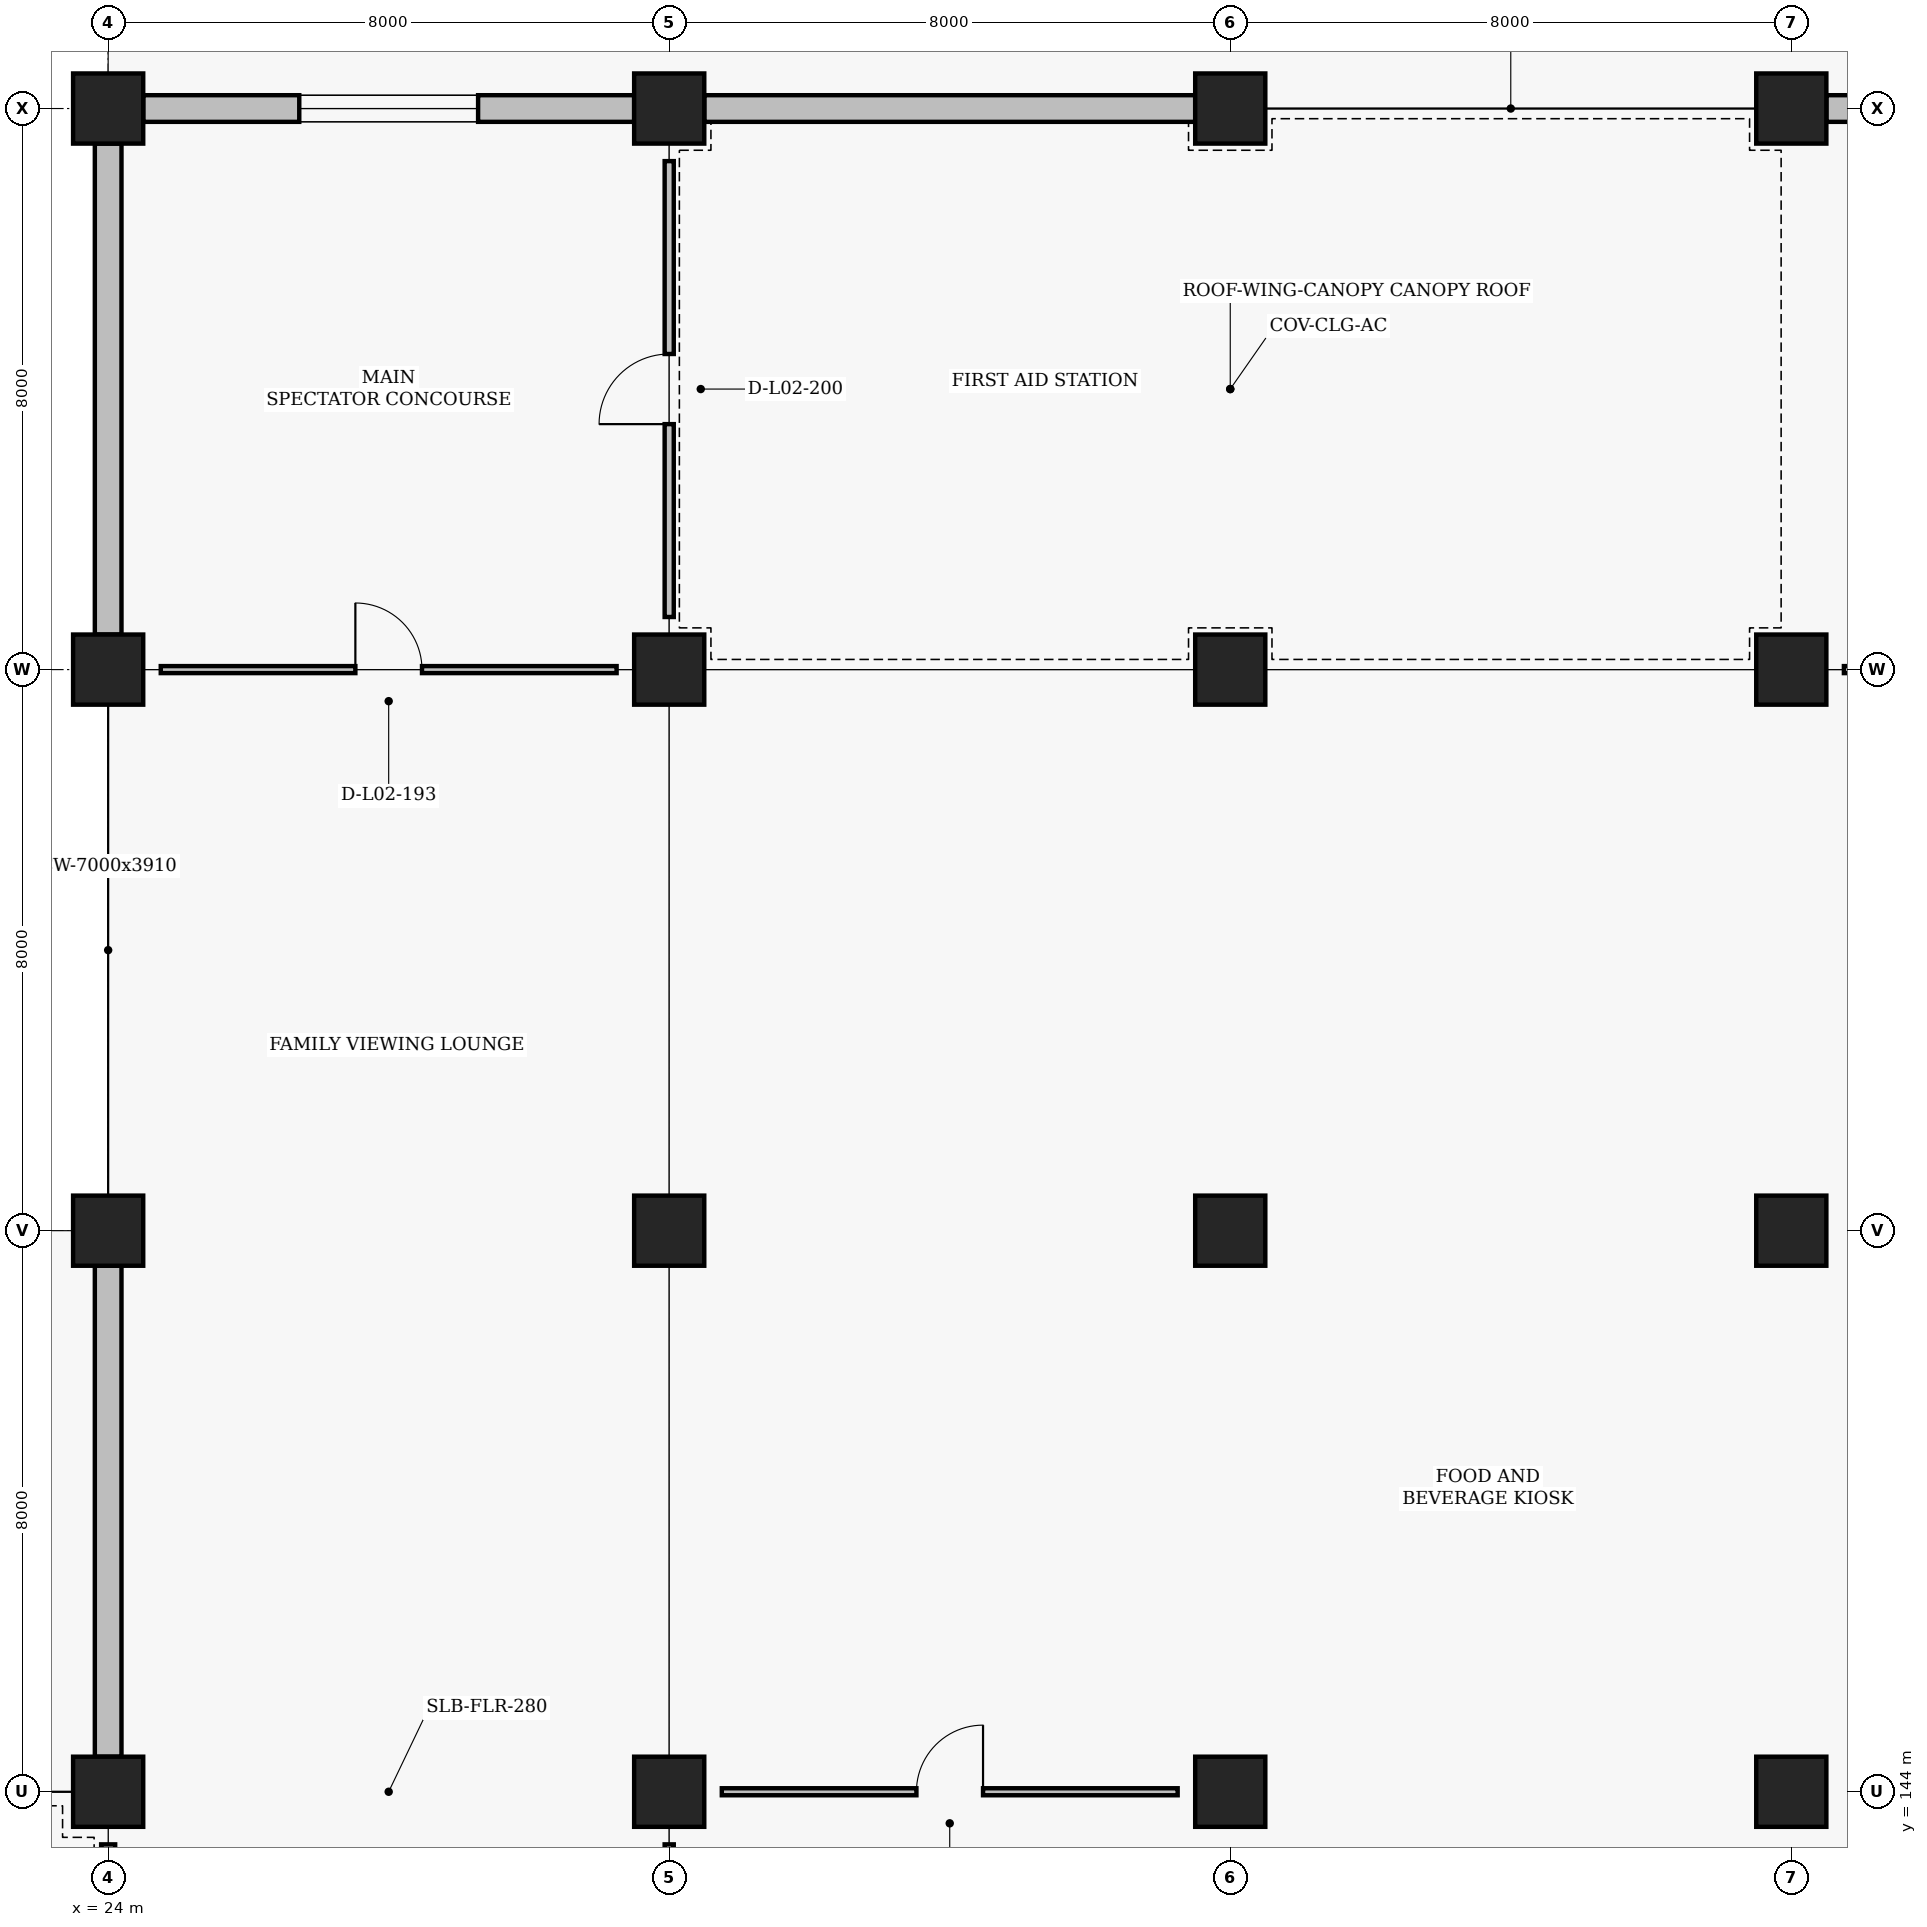
"""IFC4 building model, lengths in metres.
Left out: names, types, materials, properties, quantities, classifications, styles, units other than length and angle.
Written with IfcOpenShell. Run it as: python <this file> out.ifc"""

import sys

from ifc_helpers import new_model, si_unit, direction, frame, frame_2d, origin, origin_2d, place, context, subcontext, project, spatial, rectangle, extrude, element, fill, save


model = new_model("IFC4")
c1 = context("Model", 3, precision=1e-05, world=origin(), true_north=direction((0.0, 1.0)))
c2 = subcontext(c1, "Body", "Model", "MODEL_VIEW")
j1 = project(units=[si_unit("LENGTHUNIT", "METRE"), si_unit("PLANEANGLEUNIT", "RADIAN")], contexts=[c1])
p1 = place(None, origin())
s1 = spatial("IfcSite", under=j1, at=p1, CompositionType="ELEMENT")
p2 = place(p1, origin())
s2 = spatial("IfcBuilding", under=s1, at=p2, CompositionType="ELEMENT")
p3 = place(p2, frame((0.0, 0.0, 4.8)))
s3 = spatial("IfcBuildingStorey", under=s2, at=p3, CompositionType="ELEMENT", Elevation=4.8)
for number, where, z_axis, x_axis in (
    (1, (24.0, 144.0, 0.0), (0.0, 0.0, 1.0), (1.0, 0.0, 0.0)),
    (2, (24.0, 152.0, 0.0), (0.0, 0.0, 1.0), (1.0, 0.0, 0.0)),
    (3, (24.0, 160.0, 0.0), (0.0, 0.0, 1.0), (1.0, 0.0, 0.0)),
    (4, (24.0, 168.0, 0.0), (0.0, 0.0, 1.0), (1.0, 0.0, 0.0)),
    (5, (32.0, 144.0, 0.0), (0.0, 0.0, 1.0), (1.0, 0.0, 0.0)),
    (6, (32.0, 152.0, 0.0), (0.0, 0.0, 1.0), (1.0, 0.0, 0.0)),
    (7, (32.0, 160.0, 0.0), (0.0, 0.0, 1.0), (1.0, 0.0, 0.0)),
    (8, (32.0, 168.0, 0.0), (0.0, 0.0, 1.0), (1.0, 0.0, 0.0)),
    (9, (40.0, 144.0, 0.0), (0.0, 0.0, 1.0), (1.0, 0.0, 0.0)),
    (10, (40.0, 152.0, 0.0), (0.0, 0.0, 1.0), (1.0, 0.0, 0.0)),
    (11, (40.0, 160.0, 0.0), (0.0, 0.0, 1.0), (1.0, 0.0, 0.0)),
    (12, (40.0, 168.0, 0.0), (0.0, 0.0, 1.0), (1.0, 0.0, 0.0)),
    (13, (48.0, 144.0, 0.0), (0.0, 0.0, 1.0), (1.0, 0.0, 0.0)),
    (14, (48.0, 152.0, 0.0), (0.0, 0.0, 1.0), (1.0, 0.0, 0.0)),
    (15, (48.0, 160.0, 0.0), (0.0, 0.0, 1.0), (1.0, 0.0, 0.0)),
    (16, (48.0, 168.0, 0.0), (0.0, 0.0, 1.0), (1.0, 0.0, 0.0)),
):
    element("IfcColumn", number, at=place(p3, frame(where, z_axis=z_axis, x_axis=x_axis)), inside=s3, PredefinedType="COLUMN", context=c2, shape_type="SweptSolid", body=[
        extrude(rectangle(XDim=1.0, YDim=1.0, at=origin_2d()), origin(), (0.0, 0.0, 1.0), 4.8),
    ])
p4 = place(p3, frame((24.0, 144.5, 0.0), z_axis=(0.0, 0.0, 1.0), x_axis=(0.0, 1.0, 0.0)))
e17 = element("IfcWall", 17, at=p4, inside=s3, PredefinedType="SOLIDWALL", context=c2, shape_type="SweptSolid", body=[
    extrude(rectangle(XDim=7.0, YDim=0.38, at=frame_2d((3.5, 0.0))), origin(), (0.0, 0.0, 1.0), 3.91),
])
p5 = place(p3, frame((24.5, 168.0, 0.0), z_axis=(0.0, 0.0, 1.0), x_axis=(1.0, 0.0, 0.0)))
e18 = element("IfcWall", 18, at=p5, inside=s3, PredefinedType="SOLIDWALL", context=c2, shape_type="SweptSolid", body=[
    extrude(rectangle(XDim=7.0, YDim=0.38, at=frame_2d((3.5, 0.0))), origin(), (0.0, 0.0, 1.0), 3.95),
])
p6 = place(p5, frame((2.225, 0.0, 0.95)))
e19 = element("IfcOpeningElement", 19, at=p6, cuts=e18, PredefinedType="OPENING", context=c2, shape_type="SweptSolid", body=[
    extrude(rectangle(XDim=2.55, YDim=2.0, at=frame_2d((1.275, 1.0))), frame((0.0, 0.2, 0.0), z_axis=(0.0, -1.0, 0.0), x_axis=(1.0, 0.0, 0.0)), (0.0, 0.0, 1.0), 0.4),
])
p7 = place(p3, frame((24.0, 160.5, 0.0), z_axis=(0.0, 0.0, 1.0), x_axis=(0.0, 1.0, 0.0)))
e20 = element("IfcWall", 20, at=p7, inside=s3, PredefinedType="SOLIDWALL", context=c2, shape_type="SweptSolid", body=[
    extrude(rectangle(XDim=7.0, YDim=0.38, at=frame_2d((3.5, 0.0))), origin(), (0.0, 0.0, 1.0), 3.91),
])
for number, where, z_axis, x_axis in (
    (21, (32.5, 168.0, 0.0), (0.0, 0.0, 1.0), (1.0, 0.0, 0.0)),
    (22, (48.5, 168.0, 0.0), (0.0, 0.0, 1.0), (1.0, 0.0, 0.0)),
):
    element("IfcWall", number, at=place(p3, frame(where, z_axis=z_axis, x_axis=x_axis)), inside=s3, PredefinedType="SOLIDWALL", context=c2, shape_type="SweptSolid", body=[
        extrude(rectangle(XDim=7.0, YDim=0.38, at=frame_2d((3.5, 0.0))), origin(), (0.0, 0.0, 1.0), 3.95),
    ])
p8 = place(p3, frame((24.0, 136.75, 0.0), z_axis=(0.0, 0.0, 1.0), x_axis=(0.0, 1.0, 0.0)))
e23 = element("IfcWall", 23, at=p8, inside=s3, PredefinedType="PARTITIONING", context=c2, shape_type="SweptSolid", body=[
    extrude(rectangle(XDim=6.5, YDim=0.2, at=frame_2d((3.25, 0.0))), origin(), (0.0, 0.0, 1.0), 3.91),
])
p9 = place(p3, frame((32.0, 136.75, 0.0), z_axis=(0.0, 0.0, 1.0), x_axis=(0.0, 1.0, 0.0)))
e24 = element("IfcWall", 24, at=p9, inside=s3, PredefinedType="PARTITIONING", context=c2, shape_type="SweptSolid", body=[
    extrude(rectangle(XDim=6.5, YDim=0.13, at=frame_2d((3.25, 0.0))), origin(), (0.0, 0.0, 1.0), 3.91),
])
p10 = place(p9, frame((2.75, 0.0, 0.0)))
e25 = element("IfcOpeningElement", 25, at=p10, cuts=e24, PredefinedType="OPENING", context=c2, shape_type="SweptSolid", body=[
    extrude(rectangle(XDim=1.0, YDim=2.1, at=frame_2d((0.5, 1.05))), frame((0.0, 0.075, 0.0), z_axis=(0.0, -1.0, 0.0), x_axis=(1.0, 0.0, 0.0)), (0.0, 0.0, 1.0), 0.15),
])
p11 = place(p3, frame((24.75, 160.0, 0.0), z_axis=(0.0, 0.0, 1.0), x_axis=(1.0, 0.0, 0.0)))
e26 = element("IfcWall", 26, at=p11, inside=s3, PredefinedType="PARTITIONING", context=c2, shape_type="SweptSolid", body=[
    extrude(rectangle(XDim=6.5, YDim=0.1, at=frame_2d((3.25, 0.0))), origin(), (0.0, 0.0, 1.0), 3.91),
])
p12 = place(p11, frame((2.775, 0.0, 0.0)))
e27 = element("IfcOpeningElement", 27, at=p12, cuts=e26, PredefinedType="OPENING", context=c2, shape_type="SweptSolid", body=[
    extrude(rectangle(XDim=0.95, YDim=2.1, at=frame_2d((0.475, 1.05))), frame((0.0, 0.06, 0.0), z_axis=(0.0, -1.0, 0.0), x_axis=(1.0, 0.0, 0.0)), (0.0, 0.0, 1.0), 0.12),
])
p13 = place(p3, frame((32.75, 144.0, 0.0), z_axis=(0.0, 0.0, 1.0), x_axis=(1.0, 0.0, 0.0)))
e28 = element("IfcWall", 28, at=p13, inside=s3, PredefinedType="PARTITIONING", context=c2, shape_type="SweptSolid", body=[
    extrude(rectangle(XDim=6.5, YDim=0.1, at=frame_2d((3.25, 0.0))), origin(), (0.0, 0.0, 1.0), 3.91),
])
p14 = place(p13, frame((2.775, 0.0, 0.0)))
e29 = element("IfcOpeningElement", 29, at=p14, cuts=e28, PredefinedType="OPENING", context=c2, shape_type="SweptSolid", body=[
    extrude(rectangle(XDim=0.95, YDim=2.1, at=frame_2d((0.475, 1.05))), frame((0.0, 0.06, 0.0), z_axis=(0.0, -1.0, 0.0), x_axis=(1.0, 0.0, 0.0)), (0.0, 0.0, 1.0), 0.12),
])
p15 = place(p3, frame((32.0, 160.75, 0.0), z_axis=(0.0, 0.0, 1.0), x_axis=(0.0, 1.0, 0.0)))
e30 = element("IfcWall", 30, at=p15, inside=s3, PredefinedType="PARTITIONING", context=c2, shape_type="SweptSolid", body=[
    extrude(rectangle(XDim=6.5, YDim=0.13, at=frame_2d((3.25, 0.0))), origin(), (0.0, 0.0, 1.0), 3.97),
])
p16 = place(p15, frame((2.75, 0.0, 0.0)))
e31 = element("IfcOpeningElement", 31, at=p16, cuts=e30, PredefinedType="OPENING", context=c2, shape_type="SweptSolid", body=[
    extrude(rectangle(XDim=1.0, YDim=2.1, at=frame_2d((0.5, 1.05))), frame((0.0, 0.075, 0.0), z_axis=(0.0, -1.0, 0.0), x_axis=(1.0, 0.0, 0.0)), (0.0, 0.0, 1.0), 0.15),
])
p17 = place(p3, frame((48.75, 160.0, 0.0), z_axis=(0.0, 0.0, 1.0), x_axis=(1.0, 0.0, 0.0)))
e32 = element("IfcWall", 32, at=p17, inside=s3, PredefinedType="PARTITIONING", context=c2, shape_type="SweptSolid", body=[
    extrude(rectangle(XDim=6.5, YDim=0.1, at=frame_2d((3.25, 0.0))), origin(), (0.0, 0.0, 1.0), 3.91),
])
p18 = place(p17, frame((2.775, 0.0, 0.0)))
e33 = element("IfcOpeningElement", 33, at=p18, cuts=e32, PredefinedType="OPENING", context=c2, shape_type="SweptSolid", body=[
    extrude(rectangle(XDim=0.95, YDim=2.1, at=frame_2d((0.475, 1.05))), frame((0.0, 0.06, 0.0), z_axis=(0.0, -1.0, 0.0), x_axis=(1.0, 0.0, 0.0)), (0.0, 0.0, 1.0), 0.12),
])
p19 = place(p6, origin())
e34 = element("IfcWindow", 34, at=p19, inside=s3, PartitioningType="SINGLE_PANEL", PredefinedType="WINDOW", context=c2, shape_type="SweptSolid", body=[
    extrude(rectangle(XDim=2.55, YDim=2.0, at=frame_2d((1.275, 1.0))), frame((0.0, 0.03, 0.0), z_axis=(0.0, -1.0, 0.0), x_axis=(1.0, 0.0, 0.0)), (0.0, 0.0, 1.0), 0.06),
])
fill(e19, e34)
p20 = place(p12, origin())
e35 = element("IfcDoor", 35, at=p20, inside=s3, OperationType="SINGLE_SWING_LEFT", PredefinedType="DOOR", context=c2, shape_type="SweptSolid", body=[
    extrude(rectangle(XDim=0.95, YDim=2.1, at=frame_2d((0.475, 1.05))), frame((0.0, 0.025, 0.0), z_axis=(0.0, -1.0, 0.0), x_axis=(1.0, 0.0, 0.0)), (0.0, 0.0, 1.0), 0.05),
])
fill(e27, e35)
p21 = place(p14, origin())
e36 = element("IfcDoor", 36, at=p21, inside=s3, OperationType="SINGLE_SWING_RIGHT", PredefinedType="DOOR", context=c2, shape_type="SweptSolid", body=[
    extrude(rectangle(XDim=0.95, YDim=2.1, at=frame_2d((0.475, 1.05))), frame((0.0, 0.025, 0.0), z_axis=(0.0, -1.0, 0.0), x_axis=(1.0, 0.0, 0.0)), (0.0, 0.0, 1.0), 0.05),
])
fill(e29, e36)
p22 = place(p16, origin())
e37 = element("IfcDoor", 37, at=p22, inside=s3, OperationType="SINGLE_SWING_LEFT", PredefinedType="DOOR", context=c2, shape_type="SweptSolid", body=[
    extrude(rectangle(XDim=1.0, YDim=2.1, at=frame_2d((0.5, 1.05))), frame((0.0, 0.025, 0.0), z_axis=(0.0, -1.0, 0.0), x_axis=(1.0, 0.0, 0.0)), (0.0, 0.0, 1.0), 0.05),
])
fill(e31, e37)
save(model, sys.argv[1])
